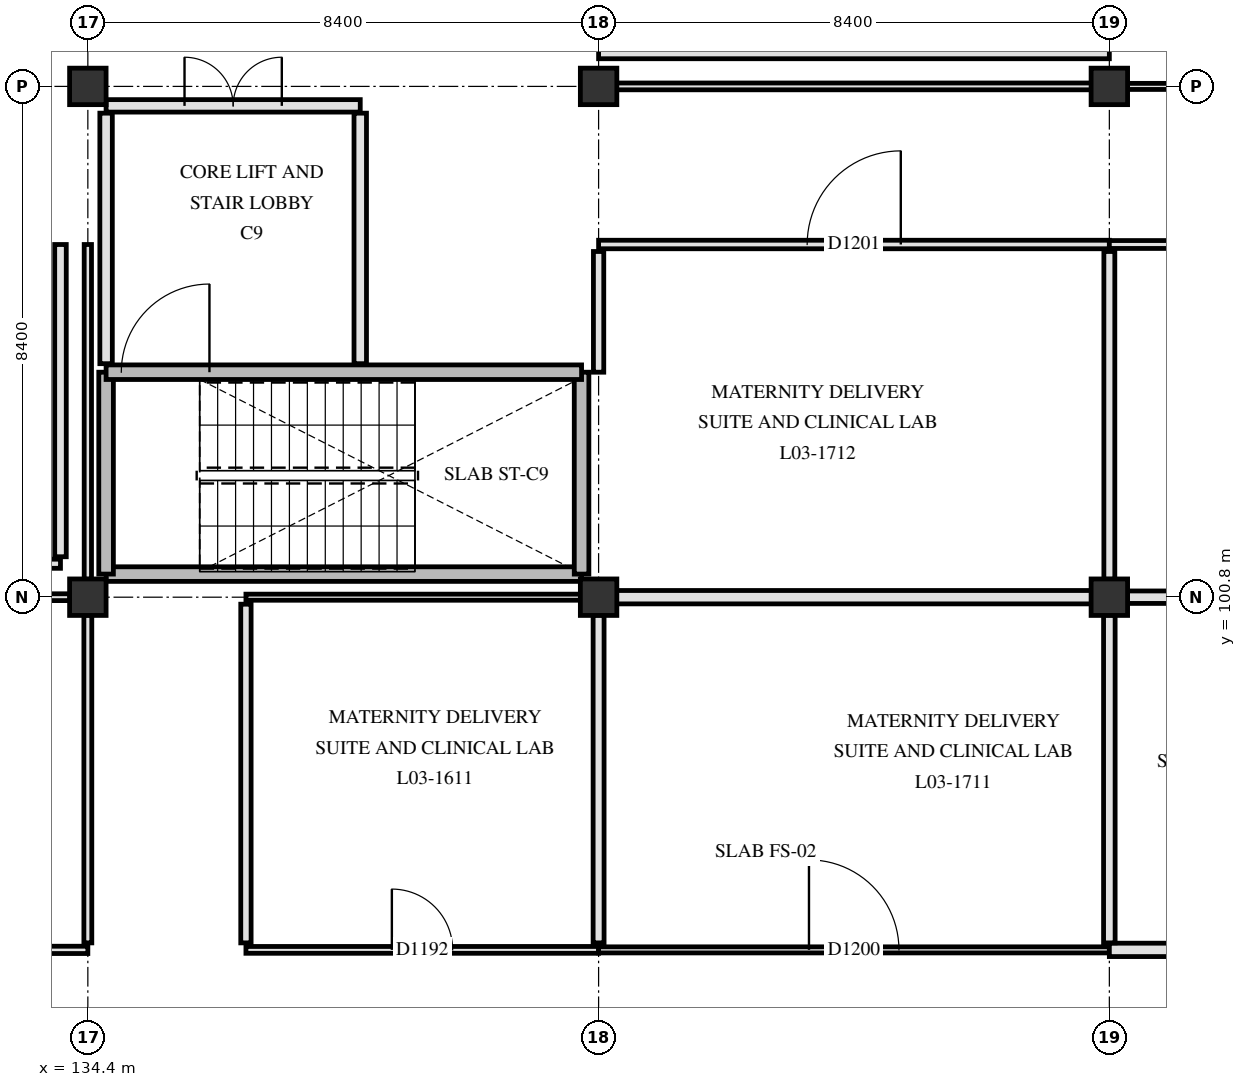
"""IFC4 building model, lengths in metres.
Left out: names, types, materials, properties, quantities, classifications, styles, units other than length and angle.
Written with IfcOpenShell. Run it as: python <this file> out.ifc"""

import sys

from ifc_helpers import new_model, si_unit, direction, frame, frame_2d, origin, origin_2d, place, context, subcontext, project, spatial, rectangle, extrude, element, fill, save


model = new_model("IFC4")
c1 = context("Model", 3, precision=1e-05, world=origin(), true_north=direction((0.0, 1.0)))
c2 = subcontext(c1, "Body", "Model", "MODEL_VIEW")
j1 = project(units=[si_unit("LENGTHUNIT", "METRE"), si_unit("PLANEANGLEUNIT", "RADIAN")], contexts=[c1])
p1 = place(None, origin())
s1 = spatial("IfcSite", under=j1, at=p1, CompositionType="ELEMENT")
p2 = place(p1, origin())
s2 = spatial("IfcBuilding", under=s1, at=p2, CompositionType="ELEMENT")
p3 = place(p2, frame((0.0, 0.0, 14.4)))
s3 = spatial("IfcBuildingStorey", under=s2, at=p3, CompositionType="ELEMENT", Elevation=14.4)
for number, where, z_axis, x_axis in (
    (1, (134.4, 100.8, 0.0), (0.0, 0.0, 1.0), (1.0, 0.0, 0.0)),
    (2, (134.4, 109.2, 0.0), (0.0, 0.0, 1.0), (1.0, 0.0, 0.0)),
    (3, (142.8, 100.8, 0.0), (0.0, 0.0, 1.0), (1.0, 0.0, 0.0)),
    (4, (142.8, 109.2, 0.0), (0.0, 0.0, 1.0), (1.0, 0.0, 0.0)),
    (5, (151.2, 100.8, 0.0), (0.0, 0.0, 1.0), (1.0, 0.0, 0.0)),
    (6, (151.2, 109.2, 0.0), (0.0, 0.0, 1.0), (1.0, 0.0, 0.0)),
):
    element("IfcColumn", number, at=place(p3, frame(where, z_axis=z_axis, x_axis=x_axis)), inside=s3, PredefinedType="COLUMN", context=c2, shape_type="SweptSolid", body=[
        extrude(rectangle(XDim=0.6, YDim=0.6, at=origin_2d()), origin(), (0.0, 0.0, 1.0), 4.2),
    ])
p4 = place(p3, frame((134.7, 101.18, 0.0), z_axis=(0.0, 0.0, 1.0), x_axis=(1.0, 0.0, 0.0)))
e7 = element("IfcWall", 7, at=p4, inside=s3, PredefinedType="SHEAR", context=c2, shape_type="SweptSolid", body=[
    extrude(rectangle(XDim=7.82, YDim=0.24, at=frame_2d((3.91, 0.0))), origin(), (0.0, 0.0, 1.0), 3.9),
])
for number, where, z_axis, x_axis in (
    (8, (134.7, 101.18, 0.0), (0.0, 0.0, 1.0), (0.0, 1.0, 0.0)),
    (9, (142.52, 101.18, 0.0), (0.0, 0.0, 1.0), (0.0, 1.0, 0.0)),
):
    element("IfcWall", number, at=place(p3, frame(where, z_axis=z_axis, x_axis=x_axis)), inside=s3, PredefinedType="SHEAR", context=c2, shape_type="SweptSolid", body=[
        extrude(rectangle(XDim=3.32, YDim=0.24, at=frame_2d((1.66, 0.0))), origin(), (0.0, 0.0, 1.0), 3.9),
    ])
p5 = place(p3, frame((134.7, 104.5, 0.0), z_axis=(0.0, 0.0, 1.0), x_axis=(1.0, 0.0, 0.0)))
e10 = element("IfcWall", 10, at=p5, inside=s3, PredefinedType="SHEAR", context=c2, shape_type="SweptSolid", body=[
    extrude(rectangle(XDim=7.82, YDim=0.24, at=frame_2d((3.91, 0.0))), origin(), (0.0, 0.0, 1.0), 3.9),
])
p6 = place(p5, frame((0.25, 0.0, 0.0)))
e11 = element("IfcOpeningElement", 11, at=p6, cuts=e10, PredefinedType="OPENING", context=c2, shape_type="SweptSolid", body=[
    extrude(rectangle(XDim=1.45, YDim=2.2, at=frame_2d((0.725, 1.1))), frame((0.0, 0.13, 0.0), z_axis=(0.0, -1.0, 0.0), x_axis=(1.0, 0.0, 0.0)), (0.0, 0.0, 1.0), 0.26),
])
p7 = place(p3, frame((138.88, 104.64, 0.0), z_axis=(0.0, 0.0, 1.0), x_axis=(0.0, 1.0, 0.0)))
e12 = element("IfcWall", 12, at=p7, inside=s3, PredefinedType="PARTITIONING", context=c2, shape_type="SweptSolid", body=[
    extrude(rectangle(XDim=4.12, YDim=0.205, at=frame_2d((2.06, 0.0))), origin(), (0.0, 0.0, 1.0), 3.89),
])
p8 = place(p3, frame((134.7, 104.64, 0.0), z_axis=(0.0, 0.0, 1.0), x_axis=(0.0, 1.0, 0.0)))
e13 = element("IfcWall", 13, at=p8, inside=s3, PredefinedType="PARTITIONING", context=c2, shape_type="SweptSolid", body=[
    extrude(rectangle(XDim=4.12, YDim=0.205, at=frame_2d((2.06, 0.0))), origin(), (0.0, 0.0, 1.0), 3.34),
])
p9 = place(p3, frame((134.7, 108.88, 0.0), z_axis=(0.0, 0.0, 1.0), x_axis=(1.0, 0.0, 0.0)))
e14 = element("IfcWall", 14, at=p9, inside=s3, PredefinedType="PARTITIONING", context=c2, shape_type="SweptSolid", body=[
    extrude(rectangle(XDim=4.18, YDim=0.205, at=frame_2d((2.09, 0.0))), origin(), (0.0, 0.0, 1.0), 3.29),
])
p10 = place(p9, frame((1.29, 0.0, 0.0)))
e15 = element("IfcOpeningElement", 15, at=p10, cuts=e14, PredefinedType="OPENING", context=c2, shape_type="SweptSolid", body=[
    extrude(rectangle(XDim=1.6, YDim=2.25, at=frame_2d((0.8, 1.125))), frame((0.0, 0.113, 0.0), z_axis=(0.0, -1.0, 0.0), x_axis=(1.0, 0.0, 0.0)), (0.0, 0.0, 1.0), 0.225),
])
p11 = place(p3, frame((128.65, 95.0, 0.0), z_axis=(0.0, 0.0, 1.0), x_axis=(1.0, 0.0, 0.0)))
e16 = element("IfcWall", 16, at=p11, inside=s3, PredefinedType="PARTITIONING", context=c2, shape_type="SweptSolid", body=[
    extrude(rectangle(XDim=5.75, YDim=0.12, at=frame_2d((2.875, 0.0))), origin(), (0.0, 0.0, 1.0), 3.34),
])
p12 = place(p11, frame((2.165, 0.0, 0.0)))
e17 = element("IfcOpeningElement", 17, at=p12, cuts=e16, PredefinedType="OPENING", context=c2, shape_type="SweptSolid", body=[
    extrude(rectangle(XDim=1.42, YDim=2.22, at=frame_2d((0.71, 1.11))), frame((0.0, 0.07, 0.0), z_axis=(0.0, -1.0, 0.0), x_axis=(1.0, 0.0, 0.0)), (0.0, 0.0, 1.0), 0.14),
])
p13 = place(p3, frame((137.0, 95.0, 0.0), z_axis=(0.0, 0.0, 1.0), x_axis=(1.0, 0.0, 0.0)))
e18 = element("IfcWall", 18, at=p13, inside=s3, PredefinedType="PARTITIONING", context=c2, shape_type="SweptSolid", body=[
    extrude(rectangle(XDim=5.8, YDim=0.112, at=frame_2d((2.9, 0.0))), origin(), (0.0, 0.0, 1.0), 3.34),
])
p14 = place(p13, frame((2.4, 0.0, 0.0)))
e19 = element("IfcOpeningElement", 19, at=p14, cuts=e18, PredefinedType="OPENING", context=c2, shape_type="SweptSolid", body=[
    extrude(rectangle(XDim=1.0, YDim=2.15, at=frame_2d((0.5, 1.075))), frame((0.0, 0.066, 0.0), z_axis=(0.0, -1.0, 0.0), x_axis=(1.0, 0.0, 0.0)), (0.0, 0.0, 1.0), 0.132),
])
p15 = place(p3, frame((142.8, 95.0, 0.0), z_axis=(0.0, 0.0, 1.0), x_axis=(1.0, 0.0, 0.0)))
e20 = element("IfcWall", 20, at=p15, inside=s3, PredefinedType="PARTITIONING", context=c2, shape_type="SweptSolid", body=[
    extrude(rectangle(XDim=8.4, YDim=0.1, at=frame_2d((4.2, 0.0))), origin(), (0.0, 0.0, 1.0), 3.34),
])
p16 = place(p15, frame((3.46, 0.0, 0.0)))
e21 = element("IfcOpeningElement", 21, at=p16, cuts=e20, PredefinedType="OPENING", context=c2, shape_type="SweptSolid", body=[
    extrude(rectangle(XDim=1.48, YDim=2.22, at=frame_2d((0.74, 1.11))), frame((0.0, 0.06, 0.0), z_axis=(0.0, -1.0, 0.0), x_axis=(1.0, 0.0, 0.0)), (0.0, 0.0, 1.0), 0.12),
])
p17 = place(p3, frame((151.2, 95.0, 0.0), z_axis=(0.0, 0.0, 1.0), x_axis=(1.0, 0.0, 0.0)))
e22 = element("IfcWall", 22, at=p17, inside=s3, PredefinedType="PARTITIONING", context=c2, shape_type="SweptSolid", body=[
    extrude(rectangle(XDim=8.4, YDim=0.22, at=frame_2d((4.2, 0.0))), origin(), (0.0, 0.0, 1.0), 3.34),
])
p18 = place(p17, frame((3.74, 0.0, 0.0)))
e23 = element("IfcOpeningElement", 23, at=p18, cuts=e22, PredefinedType="OPENING", context=c2, shape_type="SweptSolid", body=[
    extrude(rectangle(XDim=0.92, YDim=2.08, at=frame_2d((0.46, 1.04))), frame((0.0, 0.12, 0.0), z_axis=(0.0, -1.0, 0.0), x_axis=(1.0, 0.0, 0.0)), (0.0, 0.0, 1.0), 0.24),
])
p19 = place(p3, frame((128.65, 100.8, 0.0), z_axis=(0.0, 0.0, 1.0), x_axis=(1.0, 0.0, 0.0)))
e24 = element("IfcWall", 24, at=p19, inside=s3, PredefinedType="PARTITIONING", context=c2, shape_type="SweptSolid", body=[
    extrude(rectangle(XDim=5.455, YDim=0.112, at=frame_2d((2.728, 0.0))), origin(), (0.0, 0.0, 1.0), 3.29),
])
p20 = place(p3, frame((137.0, 100.8, 0.0), z_axis=(0.0, 0.0, 1.0), x_axis=(1.0, 0.0, 0.0)))
e25 = element("IfcWall", 25, at=p20, inside=s3, PredefinedType="PARTITIONING", context=c2, shape_type="SweptSolid", body=[
    extrude(rectangle(XDim=5.505, YDim=0.1, at=frame_2d((2.752, 0.0))), origin(), (0.0, 0.0, 1.0), 3.29),
])
p21 = place(p3, frame((143.095, 100.8, 0.0), z_axis=(0.0, 0.0, 1.0), x_axis=(1.0, 0.0, 0.0)))
e26 = element("IfcWall", 26, at=p21, inside=s3, PredefinedType="PARTITIONING", context=c2, shape_type="SweptSolid", body=[
    extrude(rectangle(XDim=7.81, YDim=0.22, at=frame_2d((3.905, 0.0))), origin(), (0.0, 0.0, 1.0), 3.29),
])
p22 = place(p3, frame((151.495, 100.8, 0.0), z_axis=(0.0, 0.0, 1.0), x_axis=(1.0, 0.0, 0.0)))
e27 = element("IfcWall", 27, at=p22, inside=s3, PredefinedType="PARTITIONING", context=c2, shape_type="SweptSolid", body=[
    extrude(rectangle(XDim=7.81, YDim=0.205, at=frame_2d((3.905, 0.0))), origin(), (0.0, 0.0, 1.0), 3.29),
])
p23 = place(p3, frame((131.95, 101.35, 0.0), z_axis=(0.0, 0.0, 1.0), x_axis=(1.0, 0.0, 0.0)))
e28 = element("IfcWall", 28, at=p23, inside=s3, PredefinedType="PARTITIONING", context=c2, shape_type="SweptSolid", body=[
    extrude(rectangle(XDim=2.0, YDim=0.15, at=frame_2d((1.0, 0.0))), origin(), (0.0, 0.0, 1.0), 3.89),
])
p24 = place(p3, frame((142.8, 106.6, 0.0), z_axis=(0.0, 0.0, 1.0), x_axis=(1.0, 0.0, 0.0)))
e29 = element("IfcWall", 29, at=p24, inside=s3, PredefinedType="PARTITIONING", context=c2, shape_type="SweptSolid", body=[
    extrude(rectangle(XDim=8.4, YDim=0.14, at=frame_2d((4.2, 0.0))), origin(), (0.0, 0.0, 1.0), 3.34),
])
p25 = place(p24, frame((3.43, 0.0, 0.0)))
e30 = element("IfcOpeningElement", 30, at=p25, cuts=e29, PredefinedType="OPENING", context=c2, shape_type="SweptSolid", body=[
    extrude(rectangle(XDim=1.54, YDim=2.24, at=frame_2d((0.77, 1.12))), frame((0.0, 0.08, 0.0), z_axis=(0.0, -1.0, 0.0), x_axis=(1.0, 0.0, 0.0)), (0.0, 0.0, 1.0), 0.16),
])
p26 = place(p3, frame((151.2, 106.6, 0.0), z_axis=(0.0, 0.0, 1.0), x_axis=(1.0, 0.0, 0.0)))
e31 = element("IfcWall", 31, at=p26, inside=s3, PredefinedType="PARTITIONING", context=c2, shape_type="SweptSolid", body=[
    extrude(rectangle(XDim=8.4, YDim=0.13, at=frame_2d((4.2, 0.0))), origin(), (0.0, 0.0, 1.0), 3.34),
])
p27 = place(p26, frame((3.71, 0.0, 0.0)))
e32 = element("IfcOpeningElement", 32, at=p27, cuts=e31, PredefinedType="OPENING", context=c2, shape_type="SweptSolid", body=[
    extrude(rectangle(XDim=0.98, YDim=2.12, at=frame_2d((0.49, 1.06))), frame((0.0, 0.075, 0.0), z_axis=(0.0, -1.0, 0.0), x_axis=(1.0, 0.0, 0.0)), (0.0, 0.0, 1.0), 0.15),
])
p28 = place(p3, frame((143.095, 109.2, 0.0), z_axis=(0.0, 0.0, 1.0), x_axis=(1.0, 0.0, 0.0)))
e33 = element("IfcWall", 33, at=p28, inside=s3, PredefinedType="PARTITIONING", context=c2, shape_type="SweptSolid", body=[
    extrude(rectangle(XDim=7.81, YDim=0.112, at=frame_2d((3.905, 0.0))), origin(), (0.0, 0.0, 1.0), 3.29),
])
p29 = place(p3, frame((151.495, 109.2, 0.0), z_axis=(0.0, 0.0, 1.0), x_axis=(1.0, 0.0, 0.0)))
e34 = element("IfcWall", 34, at=p29, inside=s3, PredefinedType="PARTITIONING", context=c2, shape_type="SweptSolid", body=[
    extrude(rectangle(XDim=7.81, YDim=0.1, at=frame_2d((3.905, 0.0))), origin(), (0.0, 0.0, 1.0), 3.29),
])
p30 = place(p29, frame((3.345, 0.0, 0.0)))
e35 = element("IfcOpeningElement", 35, at=p30, cuts=e34, PredefinedType="OPENING", context=c2, shape_type="SweptSolid", body=[
    extrude(rectangle(XDim=1.12, YDim=2.18, at=frame_2d((0.56, 1.09))), frame((0.0, 0.06, 0.0), z_axis=(0.0, -1.0, 0.0), x_axis=(1.0, 0.0, 0.0)), (0.0, 0.0, 1.0), 0.12),
])
p31 = place(p3, frame((142.8, 109.75, 0.0), z_axis=(0.0, 0.0, 1.0), x_axis=(1.0, 0.0, 0.0)))
e36 = element("IfcWall", 36, at=p31, inside=s3, PredefinedType="PARTITIONING", context=c2, shape_type="SweptSolid", body=[
    extrude(rectangle(XDim=8.4, YDim=0.19, at=frame_2d((4.2, 0.0))), origin(), (0.0, 0.0, 1.0), 3.34),
])
p32 = place(p3, frame((133.95, 101.465, 0.0), z_axis=(0.0, 0.0, 1.0), x_axis=(0.0, 1.0, 0.0)))
e37 = element("IfcWall", 37, at=p32, inside=s3, PredefinedType="PARTITIONING", context=c2, shape_type="SweptSolid", body=[
    extrude(rectangle(XDim=5.135, YDim=0.19, at=frame_2d((2.567, 0.0))), origin(), (0.0, 0.0, 1.0), 3.89),
])
p33 = place(p3, frame((134.4, 95.115, 0.0), z_axis=(0.0, 0.0, 1.0), x_axis=(0.0, 1.0, 0.0)))
e38 = element("IfcWall", 38, at=p33, inside=s3, PredefinedType="PARTITIONING", context=c2, shape_type="SweptSolid", body=[
    extrude(rectangle(XDim=5.39, YDim=0.13, at=frame_2d((2.695, 0.0))), origin(), (0.0, 0.0, 1.0), 3.34),
])
p34 = place(p3, frame((134.4, 101.095, 0.0), z_axis=(0.0, 0.0, 1.0), x_axis=(0.0, 1.0, 0.0)))
e39 = element("IfcWall", 39, at=p34, inside=s3, PredefinedType="PARTITIONING", context=c2, shape_type="SweptSolid", body=[
    extrude(rectangle(XDim=5.505, YDim=0.12, at=frame_2d((2.752, 0.0))), origin(), (0.0, 0.0, 1.0), 3.34),
])
p35 = place(p3, frame((137.0, 95.115, 0.0), z_axis=(0.0, 0.0, 1.0), x_axis=(0.0, 1.0, 0.0)))
e40 = element("IfcWall", 40, at=p35, inside=s3, PredefinedType="PARTITIONING", context=c2, shape_type="SweptSolid", body=[
    extrude(rectangle(XDim=5.57, YDim=0.17, at=frame_2d((2.785, 0.0))), origin(), (0.0, 0.0, 1.0), 3.29),
])
p36 = place(p3, frame((142.8, 95.115, 0.0), z_axis=(0.0, 0.0, 1.0), x_axis=(0.0, 1.0, 0.0)))
e41 = element("IfcWall", 41, at=p36, inside=s3, PredefinedType="PARTITIONING", context=c2, shape_type="SweptSolid", body=[
    extrude(rectangle(XDim=5.39, YDim=0.18, at=frame_2d((2.695, 0.0))), origin(), (0.0, 0.0, 1.0), 3.34),
])
p37 = place(p3, frame((142.8, 104.5, 0.0), z_axis=(0.0, 0.0, 1.0), x_axis=(0.0, 1.0, 0.0)))
e42 = element("IfcWall", 42, at=p37, inside=s3, PredefinedType="PARTITIONING", context=c2, shape_type="SweptSolid", body=[
    extrude(rectangle(XDim=1.985, YDim=0.17, at=frame_2d((0.993, 0.0))), origin(), (0.0, 0.0, 1.0), 3.34),
])
p38 = place(p3, frame((151.2, 95.115, 0.0), z_axis=(0.0, 0.0, 1.0), x_axis=(0.0, 1.0, 0.0)))
e43 = element("IfcWall", 43, at=p38, inside=s3, PredefinedType="PARTITIONING", context=c2, shape_type="SweptSolid", body=[
    extrude(rectangle(XDim=5.39, YDim=0.19, at=frame_2d((2.695, 0.0))), origin(), (0.0, 0.0, 1.0), 3.34),
])
p39 = place(p3, frame((151.2, 101.095, 0.0), z_axis=(0.0, 0.0, 1.0), x_axis=(0.0, 1.0, 0.0)))
e44 = element("IfcWall", 44, at=p39, inside=s3, PredefinedType="PARTITIONING", context=c2, shape_type="SweptSolid", body=[
    extrude(rectangle(XDim=5.39, YDim=0.18, at=frame_2d((2.695, 0.0))), origin(), (0.0, 0.0, 1.0), 3.34),
])
p40 = place(p6, origin())
e45 = element("IfcDoor", 45, at=p40, inside=s3, OperationType="SINGLE_SWING_RIGHT", PredefinedType="DOOR", context=c2, shape_type="SweptSolid", body=[
    extrude(rectangle(XDim=1.45, YDim=2.2, at=frame_2d((0.725, 1.1))), frame((0.0, 0.025, 0.0), z_axis=(0.0, -1.0, 0.0), x_axis=(1.0, 0.0, 0.0)), (0.0, 0.0, 1.0), 0.05),
])
fill(e11, e45)
p41 = place(p10, origin())
e46 = element("IfcDoor", 46, at=p41, inside=s3, OperationType="DOUBLE_SWING_LEFT", PredefinedType="DOOR", context=c2, shape_type="SweptSolid", body=[
    extrude(rectangle(XDim=1.6, YDim=2.25, at=frame_2d((0.8, 1.125))), frame((0.0, 0.025, 0.0), z_axis=(0.0, -1.0, 0.0), x_axis=(1.0, 0.0, 0.0)), (0.0, 0.0, 1.0), 0.05),
])
fill(e15, e46)
p42 = place(p14, origin())
e47 = element("IfcDoor", 47, at=p42, inside=s3, OperationType="SINGLE_SWING_LEFT", PredefinedType="DOOR", context=c2, shape_type="SweptSolid", body=[
    extrude(rectangle(XDim=1.0, YDim=2.15, at=frame_2d((0.5, 1.075))), frame((0.0, 0.025, 0.0), z_axis=(0.0, -1.0, 0.0), x_axis=(1.0, 0.0, 0.0)), (0.0, 0.0, 1.0), 0.05),
])
fill(e19, e47)
p43 = place(p16, origin())
e48 = element("IfcDoor", 48, at=p43, inside=s3, OperationType="SINGLE_SWING_LEFT", PredefinedType="DOOR", context=c2, shape_type="SweptSolid", body=[
    extrude(rectangle(XDim=1.48, YDim=2.22, at=frame_2d((0.74, 1.11))), frame((0.0, 0.025, 0.0), z_axis=(0.0, -1.0, 0.0), x_axis=(1.0, 0.0, 0.0)), (0.0, 0.0, 1.0), 0.05),
])
fill(e21, e48)
p44 = place(p25, origin())
e49 = element("IfcDoor", 49, at=p44, inside=s3, OperationType="SINGLE_SWING_RIGHT", PredefinedType="DOOR", context=c2, shape_type="SweptSolid", body=[
    extrude(rectangle(XDim=1.54, YDim=2.24, at=frame_2d((0.77, 1.12))), frame((0.0, 0.025, 0.0), z_axis=(0.0, -1.0, 0.0), x_axis=(1.0, 0.0, 0.0)), (0.0, 0.0, 1.0), 0.05),
])
fill(e30, e49)
save(model, sys.argv[1])
